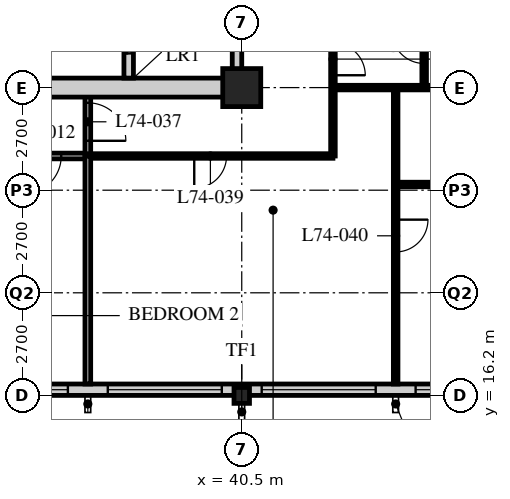
"""IFC4 building model, lengths in metres.
Left out: names, types, materials, properties, quantities, classifications, styles, units other than length and angle.
Written with IfcOpenShell. Run it as: python <this file> out.ifc"""

import sys

from ifc_helpers import new_model, si_unit, direction, frame, frame_2d, origin, origin_2d, place, context, subcontext, project, spatial, rectangle, hollow_rectangle, i_section, extrude, element, fill, save


model = new_model("IFC4")
c1 = context("Model", 3, precision=1e-05, world=origin(), true_north=direction((0.0, 1.0)))
c2 = subcontext(c1, "Body", "Model", "MODEL_VIEW")
j1 = project(units=[si_unit("LENGTHUNIT", "METRE"), si_unit("PLANEANGLEUNIT", "RADIAN")], contexts=[c1])
p1 = place(None, origin())
s1 = spatial("IfcSite", under=j1, at=p1, CompositionType="ELEMENT")
p2 = place(p1, origin())
s2 = spatial("IfcBuilding", under=s1, at=p2, CompositionType="ELEMENT")
p3 = place(p2, frame((0.0, 0.0, 289.2)))
s3 = spatial("IfcBuildingStorey", under=s2, at=p3, CompositionType="ELEMENT", Elevation=289.2)
p4 = place(p3, frame((40.5, 16.2, 0.0), z_axis=(0.0, 0.0, 1.0), x_axis=(1.0, 0.0, 0.0)))
e1 = element("IfcColumn", 1, at=p4, inside=s3, PredefinedType="COLUMN", context=c2, shape_type="SweptSolid", body=[
    extrude(i_section(OverallWidth=0.407, OverallDepth=0.419, WebThickness=0.031, FlangeThickness=0.049, FilletRadius=0.015, at=origin_2d()), origin(), (0.0, 0.0, 1.0), 3.9),
])
p5 = place(p3, frame((40.5, 24.3, 0.0), z_axis=(0.0, 0.0, 1.0), x_axis=(1.0, 0.0, 0.0)))
e2 = element("IfcColumn", 2, at=p5, inside=s3, PredefinedType="COLUMN", context=c2, shape_type="SweptSolid", body=[
    extrude(hollow_rectangle(XDim=1.0, YDim=1.0, WallThickness=0.1, at=origin_2d()), origin(), (0.0, 0.0, 1.0), 3.9),
])
p6 = place(p3, frame((8.4, 16.35, 0.0), z_axis=(0.0, 0.0, 1.0), x_axis=(1.0, 0.0, 0.0)))
e3 = element("IfcWall", 3, at=p6, inside=s3, PredefinedType="SOLIDWALL", context=c2, shape_type="SweptSolid", body=[
    extrude(rectangle(XDim=40.2, YDim=0.3, at=frame_2d((20.1, 0.0))), origin(), (0.0, 0.0, 1.0), 3.69),
])
p7 = place(p6, frame((0.225, 0.0, 0.6)))
e4 = element("IfcOpeningElement", 4, at=p7, cuts=e3, PredefinedType="OPENING", context=c2, shape_type="SweptSolid", body=[
    extrude(rectangle(XDim=3.0, YDim=2.4, at=frame_2d((1.5, 1.2))), frame((0.0, 0.16, 0.0), z_axis=(0.0, -1.0, 0.0), x_axis=(1.0, 0.0, 0.0)), (0.0, 0.0, 1.0), 0.32),
])
p8 = place(p6, frame((4.275, 0.0, 0.6)))
e5 = element("IfcOpeningElement", 5, at=p8, cuts=e3, PredefinedType="OPENING", context=c2, shape_type="SweptSolid", body=[
    extrude(rectangle(XDim=3.0, YDim=2.4, at=frame_2d((1.5, 1.2))), frame((0.0, 0.16, 0.0), z_axis=(0.0, -1.0, 0.0), x_axis=(1.0, 0.0, 0.0)), (0.0, 0.0, 1.0), 0.32),
])
p9 = place(p6, frame((8.325, 0.0, 0.6)))
e6 = element("IfcOpeningElement", 6, at=p9, cuts=e3, PredefinedType="OPENING", context=c2, shape_type="SweptSolid", body=[
    extrude(rectangle(XDim=3.0, YDim=2.4, at=frame_2d((1.5, 1.2))), frame((0.0, 0.16, 0.0), z_axis=(0.0, -1.0, 0.0), x_axis=(1.0, 0.0, 0.0)), (0.0, 0.0, 1.0), 0.32),
])
p10 = place(p6, frame((12.375, 0.0, 0.6)))
e7 = element("IfcOpeningElement", 7, at=p10, cuts=e3, PredefinedType="OPENING", context=c2, shape_type="SweptSolid", body=[
    extrude(rectangle(XDim=3.0, YDim=2.4, at=frame_2d((1.5, 1.2))), frame((0.0, 0.16, 0.0), z_axis=(0.0, -1.0, 0.0), x_axis=(1.0, 0.0, 0.0)), (0.0, 0.0, 1.0), 0.32),
])
p11 = place(p6, frame((16.425, 0.0, 0.6)))
e8 = element("IfcOpeningElement", 8, at=p11, cuts=e3, PredefinedType="OPENING", context=c2, shape_type="SweptSolid", body=[
    extrude(rectangle(XDim=3.0, YDim=2.4, at=frame_2d((1.5, 1.2))), frame((0.0, 0.16, 0.0), z_axis=(0.0, -1.0, 0.0), x_axis=(1.0, 0.0, 0.0)), (0.0, 0.0, 1.0), 0.32),
])
p12 = place(p6, frame((20.475, 0.0, 0.6)))
e9 = element("IfcOpeningElement", 9, at=p12, cuts=e3, PredefinedType="OPENING", context=c2, shape_type="SweptSolid", body=[
    extrude(rectangle(XDim=3.0, YDim=2.4, at=frame_2d((1.5, 1.2))), frame((0.0, 0.16, 0.0), z_axis=(0.0, -1.0, 0.0), x_axis=(1.0, 0.0, 0.0)), (0.0, 0.0, 1.0), 0.32),
])
p13 = place(p6, frame((24.525, 0.0, 0.6)))
e10 = element("IfcOpeningElement", 10, at=p13, cuts=e3, PredefinedType="OPENING", context=c2, shape_type="SweptSolid", body=[
    extrude(rectangle(XDim=3.0, YDim=2.4, at=frame_2d((1.5, 1.2))), frame((0.0, 0.16, 0.0), z_axis=(0.0, -1.0, 0.0), x_axis=(1.0, 0.0, 0.0)), (0.0, 0.0, 1.0), 0.32),
])
p14 = place(p6, frame((28.575, 0.0, 0.6)))
e11 = element("IfcOpeningElement", 11, at=p14, cuts=e3, PredefinedType="OPENING", context=c2, shape_type="SweptSolid", body=[
    extrude(rectangle(XDim=3.0, YDim=2.4, at=frame_2d((1.5, 1.2))), frame((0.0, 0.16, 0.0), z_axis=(0.0, -1.0, 0.0), x_axis=(1.0, 0.0, 0.0)), (0.0, 0.0, 1.0), 0.32),
])
p15 = place(p6, frame((32.625, 0.0, 0.6)))
e12 = element("IfcOpeningElement", 12, at=p15, cuts=e3, PredefinedType="OPENING", context=c2, shape_type="SweptSolid", body=[
    extrude(rectangle(XDim=3.0, YDim=2.4, at=frame_2d((1.5, 1.2))), frame((0.0, 0.16, 0.0), z_axis=(0.0, -1.0, 0.0), x_axis=(1.0, 0.0, 0.0)), (0.0, 0.0, 1.0), 0.32),
])
p16 = place(p6, frame((36.675, 0.0, 0.6)))
e13 = element("IfcOpeningElement", 13, at=p16, cuts=e3, PredefinedType="OPENING", context=c2, shape_type="SweptSolid", body=[
    extrude(rectangle(XDim=3.0, YDim=2.4, at=frame_2d((1.5, 1.2))), frame((0.0, 0.16, 0.0), z_axis=(0.0, -1.0, 0.0), x_axis=(1.0, 0.0, 0.0)), (0.0, 0.0, 1.0), 0.32),
])
p17 = place(p3, frame((12.15, 22.5, 0.0), z_axis=(0.0, 0.0, 1.0), x_axis=(1.0, 0.0, 0.0)))
e14 = element("IfcWall", 14, at=p17, inside=s3, PredefinedType="PARTITIONING", context=c2, shape_type="SweptSolid", body=[
    extrude(rectangle(XDim=24.3, YDim=0.15, at=frame_2d((12.15, 0.0))), origin(), (0.0, 0.0, 1.0), 3.69),
])
p18 = place(p17, frame((4.45, 0.0, 0.0)))
e15 = element("IfcOpeningElement", 15, at=p18, cuts=e14, PredefinedType="OPENING", context=c2, shape_type="SweptSolid", body=[
    extrude(rectangle(XDim=1.0, YDim=2.1, at=frame_2d((0.5, 1.05))), frame((0.0, 0.085, 0.0), z_axis=(0.0, -1.0, 0.0), x_axis=(1.0, 0.0, 0.0)), (0.0, 0.0, 1.0), 0.17),
])
p19 = place(p17, frame((22.6, 0.0, 0.0)))
e16 = element("IfcOpeningElement", 16, at=p19, cuts=e14, PredefinedType="OPENING", context=c2, shape_type="SweptSolid", body=[
    extrude(rectangle(XDim=1.0, YDim=2.1, at=frame_2d((0.5, 1.05))), frame((0.0, 0.085, 0.0), z_axis=(0.0, -1.0, 0.0), x_axis=(1.0, 0.0, 0.0)), (0.0, 0.0, 1.0), 0.17),
])
p20 = place(p17, frame((2.625, 0.0, 0.0)))
e17 = element("IfcOpeningElement", 17, at=p20, cuts=e14, PredefinedType="OPENING", context=c2, shape_type="SweptSolid", body=[
    extrude(rectangle(XDim=1.0, YDim=2.1, at=frame_2d((0.5, 1.05))), frame((0.0, 0.085, 0.0), z_axis=(0.0, -1.0, 0.0), x_axis=(1.0, 0.0, 0.0)), (0.0, 0.0, 1.0), 0.17),
])
p21 = place(p3, frame((36.45, 22.5, 0.0), z_axis=(0.0, 0.0, 1.0), x_axis=(0.0, 1.0, 0.0)))
e18 = element("IfcWall", 18, at=p21, inside=s3, PredefinedType="PARTITIONING", context=c2, shape_type="SweptSolid", body=[
    extrude(rectangle(XDim=1.8, YDim=0.15, at=frame_2d((0.9, 0.0))), origin(), (0.0, 0.0, 1.0), 3.69),
])
p22 = place(p21, frame((0.4, 0.0, 0.0)))
e19 = element("IfcOpeningElement", 19, at=p22, cuts=e18, PredefinedType="OPENING", context=c2, shape_type="SweptSolid", body=[
    extrude(rectangle(XDim=1.0, YDim=2.1, at=frame_2d((0.5, 1.05))), frame((0.0, 0.085, 0.0), z_axis=(0.0, -1.0, 0.0), x_axis=(1.0, 0.0, 0.0)), (0.0, 0.0, 1.0), 0.17),
])
p23 = place(p3, frame((42.9, 22.5, 0.0), z_axis=(0.0, 0.0, 1.0), x_axis=(0.0, 1.0, 0.0)))
e20 = element("IfcWall", 20, at=p23, inside=s3, PredefinedType="PARTITIONING", context=c2, shape_type="SweptSolid", body=[
    extrude(rectangle(XDim=13.95, YDim=0.12, at=frame_2d((6.975, 0.0))), origin(), (0.0, 0.0, 1.0), 3.69),
])
p24 = place(p23, frame((2.125, 0.0, 0.0)))
e21 = element("IfcOpeningElement", 21, at=p24, cuts=e20, PredefinedType="OPENING", context=c2, shape_type="SweptSolid", body=[
    extrude(rectangle(XDim=0.85, YDim=2.1, at=frame_2d((0.425, 1.05))), frame((0.0, 0.07, 0.0), z_axis=(0.0, -1.0, 0.0), x_axis=(1.0, 0.0, 0.0)), (0.0, 0.0, 1.0), 0.14),
])
p25 = place(p23, frame((6.175, 0.0, 0.0)))
e22 = element("IfcOpeningElement", 22, at=p25, cuts=e20, PredefinedType="OPENING", context=c2, shape_type="SweptSolid", body=[
    extrude(rectangle(XDim=0.85, YDim=2.1, at=frame_2d((0.425, 1.05))), frame((0.0, 0.07, 0.0), z_axis=(0.0, -1.0, 0.0), x_axis=(1.0, 0.0, 0.0)), (0.0, 0.0, 1.0), 0.14),
])
p26 = place(p23, frame((10.225, 0.0, 0.0)))
e23 = element("IfcOpeningElement", 23, at=p26, cuts=e20, PredefinedType="OPENING", context=c2, shape_type="SweptSolid", body=[
    extrude(rectangle(XDim=0.85, YDim=2.1, at=frame_2d((0.425, 1.05))), frame((0.0, 0.07, 0.0), z_axis=(0.0, -1.0, 0.0), x_axis=(1.0, 0.0, 0.0)), (0.0, 0.0, 1.0), 0.14),
])
p27 = place(p3, frame((36.45, 22.5, 0.0), z_axis=(0.0, 0.0, 1.0), x_axis=(1.0, 0.0, 0.0)))
e24 = element("IfcWall", 24, at=p27, inside=s3, PredefinedType="PARTITIONING", context=c2, shape_type="SweptSolid", body=[
    extrude(rectangle(XDim=6.45, YDim=0.12, at=frame_2d((3.225, 0.0))), origin(), (0.0, 0.0, 1.0), 3.69),
])
p28 = place(p27, frame((2.8, 0.0, 0.0)))
e25 = element("IfcOpeningElement", 25, at=p28, cuts=e24, PredefinedType="OPENING", context=c2, shape_type="SweptSolid", body=[
    extrude(rectangle(XDim=0.85, YDim=2.1, at=frame_2d((0.425, 1.05))), frame((0.0, 0.07, 0.0), z_axis=(0.0, -1.0, 0.0), x_axis=(1.0, 0.0, 0.0)), (0.0, 0.0, 1.0), 0.14),
])
p29 = place(p3, frame((42.9, 24.3, 0.0), z_axis=(0.0, 0.0, 1.0), x_axis=(1.0, 0.0, 0.0)))
e26 = element("IfcWall", 26, at=p29, inside=s3, PredefinedType="PARTITIONING", context=c2, shape_type="SweptSolid", body=[
    extrude(rectangle(XDim=9.45, YDim=0.12, at=frame_2d((4.725, 0.0))), origin(), (0.0, 0.0, 1.0), 3.078),
])
p30 = place(p3, frame((36.45, 16.5, 0.0), z_axis=(0.0, 0.0, 1.0), x_axis=(0.0, 1.0, 0.0)))
e27 = element("IfcWall", 27, at=p30, inside=s3, PredefinedType="PARTITIONING", context=c2, shape_type="SweptSolid", body=[
    extrude(rectangle(XDim=6.0, YDim=0.15, at=frame_2d((3.0, 0.0))), origin(), (0.0, 0.0, 1.0), 3.69),
])
p31 = place(p3, frame((44.55, 16.5, 0.0), z_axis=(0.0, 0.0, 1.0), x_axis=(0.0, 1.0, 0.0)))
e28 = element("IfcWall", 28, at=p31, inside=s3, PredefinedType="PARTITIONING", context=c2, shape_type="SweptSolid", body=[
    extrude(rectangle(XDim=7.8, YDim=0.12, at=frame_2d((3.9, 0.0))), origin(), (0.0, 0.0, 1.0), 3.69),
])
p32 = place(p31, frame((3.475, 0.0, 0.0)))
e29 = element("IfcOpeningElement", 29, at=p32, cuts=e28, PredefinedType="OPENING", context=c2, shape_type="SweptSolid", body=[
    extrude(rectangle(XDim=0.85, YDim=2.1, at=frame_2d((0.425, 1.05))), frame((0.0, 0.07, 0.0), z_axis=(0.0, -1.0, 0.0), x_axis=(1.0, 0.0, 0.0)), (0.0, 0.0, 1.0), 0.14),
])
p33 = place(p3, frame((45.3, 24.3, 0.0), z_axis=(0.0, 0.0, 1.0), x_axis=(0.0, 1.0, 0.0)))
e30 = element("IfcWall", 30, at=p33, inside=s3, PredefinedType="PARTITIONING", context=c2, shape_type="SweptSolid", body=[
    extrude(rectangle(XDim=1.76, YDim=0.12, at=frame_2d((0.88, 0.0))), origin(), (0.0, 0.0, 1.0), 3.69),
])
p34 = place(p33, frame((0.635, 0.0, 0.0)))
e31 = element("IfcOpeningElement", 31, at=p34, cuts=e30, PredefinedType="OPENING", context=c2, shape_type="SweptSolid", body=[
    extrude(rectangle(XDim=0.85, YDim=2.1, at=frame_2d((0.425, 1.05))), frame((0.0, 0.07, 0.0), z_axis=(0.0, -1.0, 0.0), x_axis=(1.0, 0.0, 0.0)), (0.0, 0.0, 1.0), 0.14),
])
p35 = place(p3, frame((44.55, 21.75, 0.0), z_axis=(0.0, 0.0, 1.0), x_axis=(1.0, 0.0, 0.0)))
e32 = element("IfcWall", 32, at=p35, inside=s3, PredefinedType="PARTITIONING", context=c2, shape_type="SweptSolid", body=[
    extrude(rectangle(XDim=7.8, YDim=0.12, at=frame_2d((3.9, 0.0))), origin(), (0.0, 0.0, 1.0), 3.69),
])
p36 = place(p35, frame((3.475, 0.0, 0.0)))
e33 = element("IfcOpeningElement", 33, at=p36, cuts=e32, PredefinedType="OPENING", context=c2, shape_type="SweptSolid", body=[
    extrude(rectangle(XDim=0.85, YDim=2.1, at=frame_2d((0.425, 1.05))), frame((0.0, 0.07, 0.0), z_axis=(0.0, -1.0, 0.0), x_axis=(1.0, 0.0, 0.0)), (0.0, 0.0, 1.0), 0.14),
])
p37 = place(p3, frame((15.95, 24.3, 0.0), z_axis=(0.0, 0.0, 1.0), x_axis=(1.0, 0.0, 0.0)))
e34 = element("IfcWall", 34, at=p37, inside=s3, PredefinedType="SOLIDWALL", context=c2, shape_type="SweptSolid", body=[
    extrude(rectangle(XDim=24.55, YDim=0.5, at=frame_2d((12.275, 0.0))), origin(), (0.0, 0.0, 1.0), 3.04),
])
p38 = place(p37, frame((11.5, 0.0, 0.0)))
e35 = element("IfcOpeningElement", 35, at=p38, cuts=e34, PredefinedType="OPENING", context=c2, shape_type="SweptSolid", body=[
    extrude(rectangle(XDim=1.8, YDim=2.4, at=frame_2d((0.9, 1.2))), frame((0.0, 0.26, 0.0), z_axis=(0.0, -1.0, 0.0), x_axis=(1.0, 0.0, 0.0)), (0.0, 0.0, 1.0), 0.52),
])
p39 = place(p3, frame((40.375, 24.55, 0.0), z_axis=(0.0, 0.0, 1.0), x_axis=(0.0, 1.0, 0.0)))
e36 = element("IfcWall", 36, at=p39, inside=s3, PredefinedType="SOLIDWALL", context=c2, shape_type="SweptSolid", body=[
    extrude(rectangle(XDim=15.7, YDim=0.25, at=frame_2d((7.85, 0.0))), origin(), (0.0, 0.0, 1.0), 3.078),
])
p40 = place(p3, frame((37.525, 24.55, 0.0), z_axis=(0.0, 0.0, 1.0), x_axis=(0.0, 1.0, 0.0)))
e37 = element("IfcWall", 37, at=p40, inside=s3, PredefinedType="SOLIDWALL", context=c2, shape_type="SweptSolid", body=[
    extrude(rectangle(XDim=7.75, YDim=0.25, at=frame_2d((3.875, 0.0))), origin(), (0.0, 0.0, 1.0), 3.69),
])
p41 = place(p40, frame((0.65, 0.0, 0.0)))
e38 = element("IfcOpeningElement", 38, at=p41, cuts=e37, PredefinedType="OPENING", context=c2, shape_type="SweptSolid", body=[
    extrude(rectangle(XDim=1.1, YDim=2.4, at=frame_2d((0.55, 1.2))), frame((0.0, 0.135, 0.0), z_axis=(0.0, -1.0, 0.0), x_axis=(1.0, 0.0, 0.0)), (0.0, 0.0, 1.0), 0.27),
])
p42 = place(p40, frame((3.25, 0.0, 0.0)))
e39 = element("IfcOpeningElement", 39, at=p42, cuts=e37, PredefinedType="OPENING", context=c2, shape_type="SweptSolid", body=[
    extrude(rectangle(XDim=1.1, YDim=2.4, at=frame_2d((0.55, 1.2))), frame((0.0, 0.135, 0.0), z_axis=(0.0, -1.0, 0.0), x_axis=(1.0, 0.0, 0.0)), (0.0, 0.0, 1.0), 0.27),
])
p43 = place(p40, frame((5.85, 0.0, 0.0)))
e40 = element("IfcOpeningElement", 40, at=p43, cuts=e37, PredefinedType="OPENING", context=c2, shape_type="SweptSolid", body=[
    extrude(rectangle(XDim=1.1, YDim=2.4, at=frame_2d((0.55, 1.2))), frame((0.0, 0.135, 0.0), z_axis=(0.0, -1.0, 0.0), x_axis=(1.0, 0.0, 0.0)), (0.0, 0.0, 1.0), 0.27),
])
p44 = place(p13, origin())
e41 = element("IfcWindow", 41, at=p44, inside=s3, PartitioningType="SINGLE_PANEL", PredefinedType="WINDOW", context=c2, shape_type="SweptSolid", body=[
    extrude(rectangle(XDim=3.0, YDim=2.4, at=frame_2d((1.5, 1.2))), frame((0.0, 0.03, 0.0), z_axis=(0.0, -1.0, 0.0), x_axis=(1.0, 0.0, 0.0)), (0.0, 0.0, 1.0), 0.06),
])
fill(e10, e41)
p45 = place(p14, origin())
e42 = element("IfcWindow", 42, at=p45, inside=s3, PartitioningType="SINGLE_PANEL", PredefinedType="WINDOW", context=c2, shape_type="SweptSolid", body=[
    extrude(rectangle(XDim=3.0, YDim=2.4, at=frame_2d((1.5, 1.2))), frame((0.0, 0.03, 0.0), z_axis=(0.0, -1.0, 0.0), x_axis=(1.0, 0.0, 0.0)), (0.0, 0.0, 1.0), 0.06),
])
fill(e11, e42)
p46 = place(p15, origin())
e43 = element("IfcWindow", 43, at=p46, inside=s3, PartitioningType="SINGLE_PANEL", PredefinedType="WINDOW", context=c2, shape_type="SweptSolid", body=[
    extrude(rectangle(XDim=3.0, YDim=2.4, at=frame_2d((1.5, 1.2))), frame((0.0, 0.03, 0.0), z_axis=(0.0, -1.0, 0.0), x_axis=(1.0, 0.0, 0.0)), (0.0, 0.0, 1.0), 0.06),
])
fill(e12, e43)
p47 = place(p16, origin())
e44 = element("IfcWindow", 44, at=p47, inside=s3, PartitioningType="SINGLE_PANEL", PredefinedType="WINDOW", context=c2, shape_type="SweptSolid", body=[
    extrude(rectangle(XDim=3.0, YDim=2.4, at=frame_2d((1.5, 1.2))), frame((0.0, 0.03, 0.0), z_axis=(0.0, -1.0, 0.0), x_axis=(1.0, 0.0, 0.0)), (0.0, 0.0, 1.0), 0.06),
])
fill(e13, e44)
p48 = place(p19, origin())
e45 = element("IfcDoor", 45, at=p48, inside=s3, OperationType="SINGLE_SWING_RIGHT", PredefinedType="DOOR", context=c2, shape_type="SweptSolid", body=[
    extrude(rectangle(XDim=1.0, YDim=2.1, at=frame_2d((0.5, 1.05))), frame((0.0, 0.025, 0.0), z_axis=(0.0, -1.0, 0.0), x_axis=(1.0, 0.0, 0.0)), (0.0, 0.0, 1.0), 0.05),
])
fill(e16, e45)
p49 = place(p22, origin())
e46 = element("IfcDoor", 46, at=p49, inside=s3, OperationType="SINGLE_SWING_RIGHT", PredefinedType="DOOR", context=c2, shape_type="SweptSolid", body=[
    extrude(rectangle(XDim=1.0, YDim=2.1, at=frame_2d((0.5, 1.05))), frame((0.0, 0.025, 0.0), z_axis=(0.0, -1.0, 0.0), x_axis=(1.0, 0.0, 0.0)), (0.0, 0.0, 1.0), 0.05),
])
fill(e19, e46)
p50 = place(p28, origin())
e47 = element("IfcDoor", 47, at=p50, inside=s3, OperationType="SINGLE_SWING_RIGHT", PredefinedType="DOOR", context=c2, shape_type="SweptSolid", body=[
    extrude(rectangle(XDim=0.85, YDim=2.1, at=frame_2d((0.425, 1.05))), frame((0.0, 0.025, 0.0), z_axis=(0.0, -1.0, 0.0), x_axis=(1.0, 0.0, 0.0)), (0.0, 0.0, 1.0), 0.05),
])
fill(e25, e47)
p51 = place(p32, origin())
e48 = element("IfcDoor", 48, at=p51, inside=s3, OperationType="SINGLE_SWING_LEFT", PredefinedType="DOOR", context=c2, shape_type="SweptSolid", body=[
    extrude(rectangle(XDim=0.85, YDim=2.1, at=frame_2d((0.425, 1.05))), frame((0.0, 0.025, 0.0), z_axis=(0.0, -1.0, 0.0), x_axis=(1.0, 0.0, 0.0)), (0.0, 0.0, 1.0), 0.05),
])
fill(e29, e48)
p52 = place(p24, origin())
e49 = element("IfcDoor", 49, at=p52, inside=s3, OperationType="SINGLE_SWING_RIGHT", PredefinedType="DOOR", context=c2, shape_type="SweptSolid", body=[
    extrude(rectangle(XDim=0.85, YDim=2.1, at=frame_2d((0.425, 1.05))), frame((0.0, 0.025, 0.0), z_axis=(0.0, -1.0, 0.0), x_axis=(1.0, 0.0, 0.0)), (0.0, 0.0, 1.0), 0.05),
])
fill(e21, e49)
p53 = place(p34, origin())
e50 = element("IfcDoor", 50, at=p53, inside=s3, OperationType="SINGLE_SWING_RIGHT", PredefinedType="DOOR", context=c2, shape_type="SweptSolid", body=[
    extrude(rectangle(XDim=0.85, YDim=2.1, at=frame_2d((0.425, 1.05))), frame((0.0, 0.025, 0.0), z_axis=(0.0, -1.0, 0.0), x_axis=(1.0, 0.0, 0.0)), (0.0, 0.0, 1.0), 0.05),
])
fill(e31, e50)
p54 = place(p41, origin())
e51 = element("IfcDoor", 51, at=p54, inside=s3, OperationType="DOUBLE_DOOR_SLIDING", PredefinedType="DOOR", context=c2, shape_type="SweptSolid", body=[
    extrude(rectangle(XDim=1.1, YDim=2.4, at=frame_2d((0.55, 1.2))), frame((0.0, 0.025, 0.0), z_axis=(0.0, -1.0, 0.0), x_axis=(1.0, 0.0, 0.0)), (0.0, 0.0, 1.0), 0.05),
])
fill(e38, e51)
save(model, sys.argv[1])
